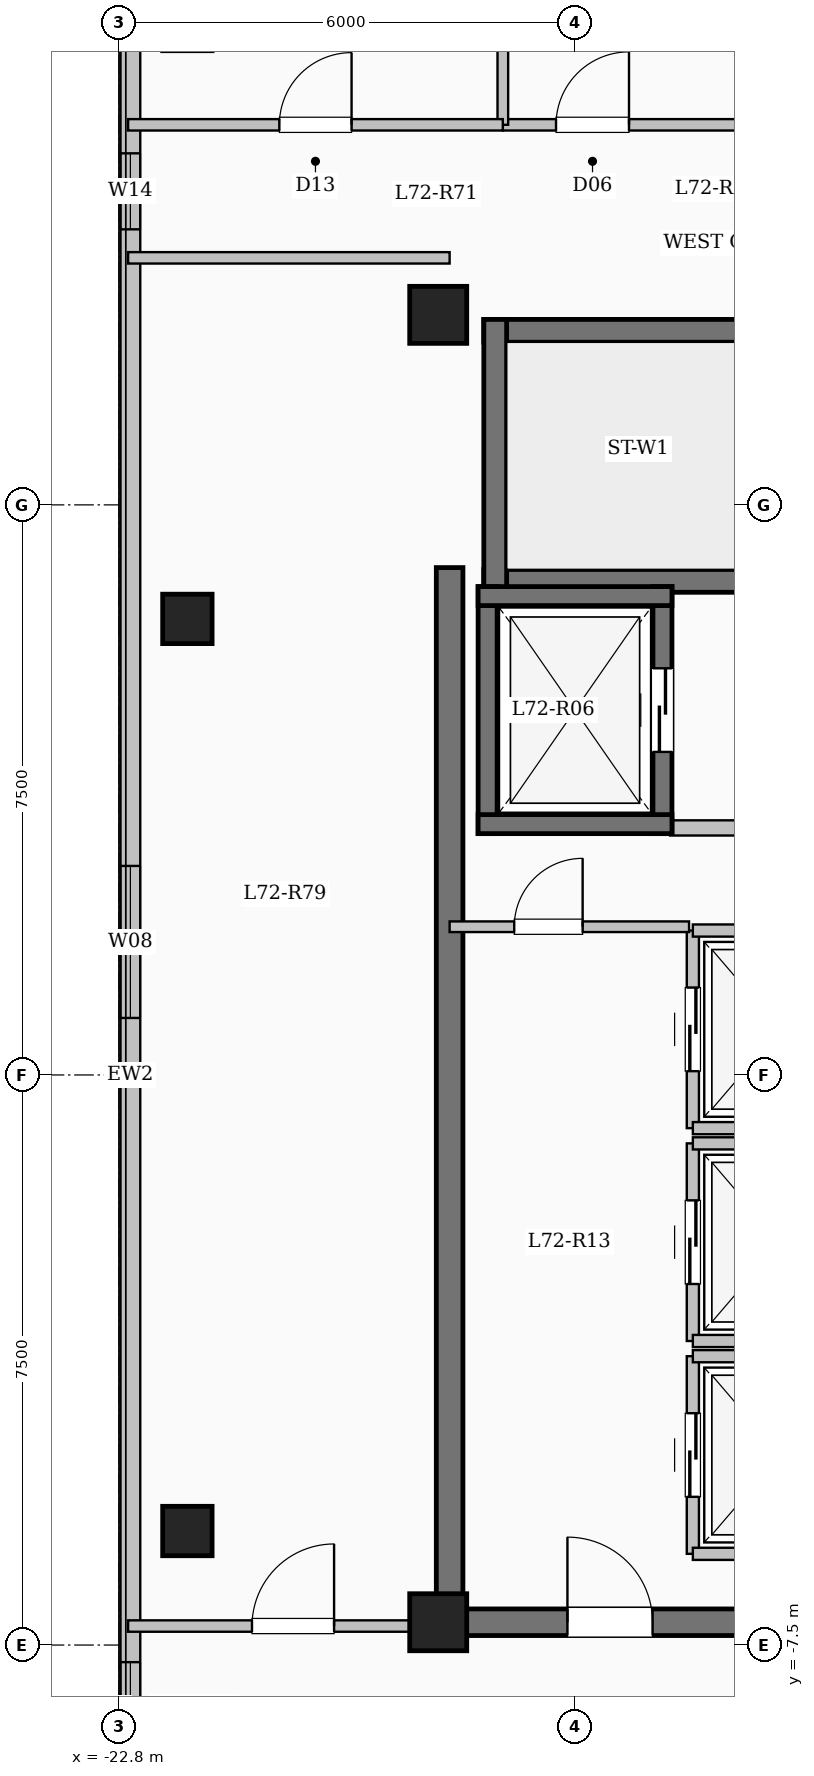
"""IFC4 building model, lengths in metres.
Left out: names, types, materials, properties, quantities, classifications, styles, units other than length and angle.
Written with IfcOpenShell. Run it as: python <this file> out.ifc"""

import sys

from ifc_helpers import new_model, si_unit, direction, frame, frame_2d, origin, origin_2d, place, context, subcontext, project, spatial, rectangle, extrude, element, fill, save


model = new_model("IFC4")
c1 = context("Model", 3, precision=1e-05, world=origin(), true_north=direction((0.0, 1.0)))
c2 = subcontext(c1, "Body", "Model", "MODEL_VIEW")
j1 = project(units=[si_unit("LENGTHUNIT", "METRE"), si_unit("PLANEANGLEUNIT", "RADIAN")], contexts=[c1])
p1 = place(None, origin())
s1 = spatial("IfcSite", under=j1, at=p1, CompositionType="ELEMENT")
p2 = place(p1, origin())
s2 = spatial("IfcBuilding", under=s1, at=p2, CompositionType="ELEMENT")
p3 = place(p2, frame((0.0, 0.0, 264.95)))
s3 = spatial("IfcBuildingStorey", under=s2, at=p3, CompositionType="ELEMENT", Elevation=264.95)
for number, where, z_axis, x_axis in (
    (1, (-18.6, -7.2, 0.0), (0.0, 0.0, 1.0), (1.0, 0.0, 0.0)),
    (2, (-18.6, 10.0, 0.0), (0.0, 0.0, 1.0), (1.0, 0.0, 0.0)),
):
    element("IfcColumn", number, at=place(p3, frame(where, z_axis=z_axis, x_axis=x_axis)), inside=s3, PredefinedType="COLUMN", context=c2, shape_type="SweptSolid", body=[
        extrude(rectangle(XDim=0.75, YDim=0.75, at=origin_2d()), origin(), (0.0, 0.0, 1.0), 3.35),
    ])
for number, where, z_axis, x_axis in (
    (3, (-21.9, -6.0, 0.0), (0.0, 0.0, 1.0), (1.0, 0.0, 0.0)),
    (4, (-21.9, 6.0, 0.0), (0.0, 0.0, 1.0), (1.0, 0.0, 0.0)),
):
    element("IfcColumn", number, at=place(p3, frame(where, z_axis=z_axis, x_axis=x_axis)), inside=s3, PredefinedType="COLUMN", context=c2, shape_type="SweptSolid", body=[
        extrude(rectangle(XDim=0.65, YDim=0.65, at=origin_2d()), origin(), (0.0, 0.0, 1.0), 3.35),
    ])
p4 = place(p3, frame((-22.65, -17.55, 0.0), z_axis=(0.0, 0.0, 1.0), x_axis=(0.0, 1.0, 0.0)))
e5 = element("IfcWall", 5, at=p4, inside=s3, PredefinedType="SOLIDWALL", context=c2, shape_type="SweptSolid", body=[
    extrude(rectangle(XDim=35.1, YDim=0.26, at=frame_2d((17.55, 0.0))), origin(), (0.0, 0.0, 1.0), 3.1),
])
p5 = place(p4, frame((2.975, 0.0, 0.9)))
e6 = element("IfcOpeningElement", 6, at=p5, cuts=e5, PredefinedType="OPENING", context=c2, shape_type="SweptSolid", body=[
    extrude(rectangle(XDim=2.2, YDim=1.75, at=frame_2d((1.1, 0.875))), frame((0.0, 0.14, 0.0), z_axis=(0.0, -1.0, 0.0), x_axis=(1.0, 0.0, 0.0)), (0.0, 0.0, 1.0), 0.28),
])
p6 = place(p4, frame((8.625, 0.0, 0.95)))
e7 = element("IfcOpeningElement", 7, at=p6, cuts=e5, PredefinedType="OPENING", context=c2, shape_type="SweptSolid", body=[
    extrude(rectangle(XDim=1.2, YDim=1.5, at=frame_2d((0.6, 0.75))), frame((0.0, 0.14, 0.0), z_axis=(0.0, -1.0, 0.0), x_axis=(1.0, 0.0, 0.0)), (0.0, 0.0, 1.0), 0.28),
])
p7 = place(p4, frame((18.3, 0.0, 0.9)))
e8 = element("IfcOpeningElement", 8, at=p7, cuts=e5, PredefinedType="OPENING", context=c2, shape_type="SweptSolid", body=[
    extrude(rectangle(XDim=2.0, YDim=1.7, at=frame_2d((1.0, 0.85))), frame((0.0, 0.14, 0.0), z_axis=(0.0, -1.0, 0.0), x_axis=(1.0, 0.0, 0.0)), (0.0, 0.0, 1.0), 0.28),
])
p8 = place(p4, frame((28.675, 0.0, 0.95)))
e9 = element("IfcOpeningElement", 9, at=p8, cuts=e5, PredefinedType="OPENING", context=c2, shape_type="SweptSolid", body=[
    extrude(rectangle(XDim=1.0, YDim=1.5, at=frame_2d((0.5, 0.75))), frame((0.0, 0.14, 0.0), z_axis=(0.0, -1.0, 0.0), x_axis=(1.0, 0.0, 0.0)), (0.0, 0.0, 1.0), 0.28),
])
p9 = place(p4, frame((31.6, 0.0, 0.9)))
e10 = element("IfcOpeningElement", 10, at=p9, cuts=e5, PredefinedType="OPENING", context=c2, shape_type="SweptSolid", body=[
    extrude(rectangle(XDim=2.0, YDim=1.7, at=frame_2d((1.0, 0.85))), frame((0.0, 0.14, 0.0), z_axis=(0.0, -1.0, 0.0), x_axis=(1.0, 0.0, 0.0)), (0.0, 0.0, 1.0), 0.28),
])
p10 = place(p3, frame((-18.0, 9.79, 0.0), z_axis=(0.0, 0.0, 1.0), x_axis=(1.0, 0.0, 0.0)))
e11 = element("IfcWall", 11, at=p10, inside=s3, PredefinedType="SHEAR", context=c2, shape_type="SweptSolid", body=[
    extrude(rectangle(XDim=8.0, YDim=0.3, at=frame_2d((4.0, 0.0))), origin(), (0.0, 0.0, 1.0), 3.35),
])
p11 = place(p3, frame((-18.0, 6.5, 0.0), z_axis=(0.0, 0.0, 1.0), x_axis=(1.0, 0.0, 0.0)))
e12 = element("IfcWall", 12, at=p11, inside=s3, PredefinedType="SHEAR", context=c2, shape_type="SweptSolid", body=[
    extrude(rectangle(XDim=8.0, YDim=0.3, at=frame_2d((4.0, 0.0))), origin(), (0.0, 0.0, 1.0), 3.35),
])
p12 = place(p11, frame((6.45, 0.0, 0.0)))
e13 = element("IfcOpeningElement", 13, at=p12, cuts=e12, PredefinedType="OPENING", context=c2, shape_type="SweptSolid", body=[
    extrude(rectangle(XDim=1.0, YDim=2.15, at=frame_2d((0.5, 1.075))), frame((0.0, 0.16, 0.0), z_axis=(0.0, -1.0, 0.0), x_axis=(1.0, 0.0, 0.0)), (0.0, 0.0, 1.0), 0.32),
])
p13 = place(p3, frame((-17.85, 6.35, 0.0), z_axis=(0.0, 0.0, 1.0), x_axis=(0.0, 1.0, 0.0)))
e14 = element("IfcWall", 14, at=p13, inside=s3, PredefinedType="SHEAR", context=c2, shape_type="SweptSolid", body=[
    extrude(rectangle(XDim=3.59, YDim=0.3, at=frame_2d((1.795, 0.0))), origin(), (0.0, 0.0, 1.0), 3.35),
])
p14 = place(p3, frame((-15.55, 3.25, 0.0), z_axis=(0.0, 0.0, 1.0), x_axis=(1.0, 0.0, 0.0)))
e15 = element("IfcWall", 15, at=p14, inside=s3, PredefinedType="SOLIDWALL", context=c2, shape_type="SweptSolid", body=[
    extrude(rectangle(XDim=5.4, YDim=0.2, at=frame_2d((2.7, 0.0))), origin(), (0.0, 0.0, 1.0), 3.1),
])
p15 = place(p3, frame((-17.95, 3.175, 0.0), z_axis=(0.0, 0.0, 1.0), x_axis=(0.0, 1.0, 0.0)))
e16 = element("IfcWall", 16, at=p15, inside=s3, PredefinedType="SHEAR", context=c2, shape_type="SweptSolid", body=[
    extrude(rectangle(XDim=3.25, YDim=0.25, at=frame_2d((1.625, 0.0))), origin(), (0.0, 0.0, 1.0), 3.35),
])
p16 = place(p3, frame((-15.65, 3.175, 0.0), z_axis=(0.0, 0.0, 1.0), x_axis=(0.0, 1.0, 0.0)))
e17 = element("IfcWall", 17, at=p16, inside=s3, PredefinedType="SHEAR", context=c2, shape_type="SweptSolid", body=[
    extrude(rectangle(XDim=3.25, YDim=0.25, at=frame_2d((1.625, 0.0))), origin(), (0.0, 0.0, 1.0), 3.35),
])
p17 = place(p16, frame((1.075, 0.0, 0.0)))
e18 = element("IfcOpeningElement", 18, at=p17, cuts=e17, PredefinedType="OPENING", context=c2, shape_type="SweptSolid", body=[
    extrude(rectangle(XDim=1.1, YDim=2.15, at=frame_2d((0.55, 1.075))), frame((0.0, 0.135, 0.0), z_axis=(0.0, -1.0, 0.0), x_axis=(1.0, 0.0, 0.0)), (0.0, 0.0, 1.0), 0.27),
])
for number, where, z_axis, x_axis in (
    (19, (-18.075, 3.3, 0.0), (0.0, 0.0, 1.0), (1.0, 0.0, 0.0)),
    (20, (-18.075, 6.3, 0.0), (0.0, 0.0, 1.0), (1.0, 0.0, 0.0)),
):
    element("IfcWall", number, at=place(p3, frame(where, z_axis=z_axis, x_axis=x_axis)), inside=s3, PredefinedType="SHEAR", context=c2, shape_type="SweptSolid", body=[
        extrude(rectangle(XDim=2.55, YDim=0.25, at=frame_2d((1.275, 0.0))), origin(), (0.0, 0.0, 1.0), 3.35),
    ])
p18 = place(p3, frame((-15.25, -6.3, 0.0), z_axis=(0.0, 0.0, 1.0), x_axis=(0.0, 1.0, 0.0)))
e21 = element("IfcWall", 21, at=p18, inside=s3, PredefinedType="SOLIDWALL", context=c2, shape_type="SweptSolid", body=[
    extrude(rectangle(XDim=2.6, YDim=0.16, at=frame_2d((1.3, 0.0))), origin(), (0.0, 0.0, 1.0), 3.1),
])
p19 = place(p18, frame((0.75, 0.0, 0.0)))
e22 = element("IfcOpeningElement", 22, at=p19, cuts=e21, PredefinedType="OPENING", context=c2, shape_type="SweptSolid", body=[
    extrude(rectangle(XDim=1.1, YDim=2.15, at=frame_2d((0.55, 1.075))), frame((0.0, 0.09, 0.0), z_axis=(0.0, -1.0, 0.0), x_axis=(1.0, 0.0, 0.0)), (0.0, 0.0, 1.0), 0.18),
])
for number, where, z_axis, x_axis in (
    (23, (-15.25, -6.3, 0.0), (0.0, 0.0, 1.0), (1.0, 0.0, 0.0)),
    (24, (-15.25, -3.7, 0.0), (0.0, 0.0, 1.0), (1.0, 0.0, 0.0)),
):
    element("IfcWall", number, at=place(p3, frame(where, z_axis=z_axis, x_axis=x_axis)), inside=s3, PredefinedType="SOLIDWALL", context=c2, shape_type="SweptSolid", body=[
        extrude(rectangle(XDim=2.3, YDim=0.16, at=frame_2d((1.15, 0.0))), origin(), (0.0, 0.0, 1.0), 3.1),
    ])
p20 = place(p3, frame((-15.25, -3.5, 0.0), z_axis=(0.0, 0.0, 1.0), x_axis=(0.0, 1.0, 0.0)))
e25 = element("IfcWall", 25, at=p20, inside=s3, PredefinedType="SOLIDWALL", context=c2, shape_type="SweptSolid", body=[
    extrude(rectangle(XDim=2.6, YDim=0.16, at=frame_2d((1.3, 0.0))), origin(), (0.0, 0.0, 1.0), 3.1),
])
p21 = place(p20, frame((0.75, 0.0, 0.0)))
e26 = element("IfcOpeningElement", 26, at=p21, cuts=e25, PredefinedType="OPENING", context=c2, shape_type="SweptSolid", body=[
    extrude(rectangle(XDim=1.1, YDim=2.15, at=frame_2d((0.55, 1.075))), frame((0.0, 0.09, 0.0), z_axis=(0.0, -1.0, 0.0), x_axis=(1.0, 0.0, 0.0)), (0.0, 0.0, 1.0), 0.18),
])
for number, where, z_axis, x_axis in (
    (27, (-15.25, -3.5, 0.0), (0.0, 0.0, 1.0), (1.0, 0.0, 0.0)),
    (28, (-15.25, -0.9, 0.0), (0.0, 0.0, 1.0), (1.0, 0.0, 0.0)),
):
    element("IfcWall", number, at=place(p3, frame(where, z_axis=z_axis, x_axis=x_axis)), inside=s3, PredefinedType="SOLIDWALL", context=c2, shape_type="SweptSolid", body=[
        extrude(rectangle(XDim=2.3, YDim=0.16, at=frame_2d((1.15, 0.0))), origin(), (0.0, 0.0, 1.0), 3.1),
    ])
p22 = place(p3, frame((-15.25, -0.7, 0.0), z_axis=(0.0, 0.0, 1.0), x_axis=(0.0, 1.0, 0.0)))
e29 = element("IfcWall", 29, at=p22, inside=s3, PredefinedType="SOLIDWALL", context=c2, shape_type="SweptSolid", body=[
    extrude(rectangle(XDim=2.6, YDim=0.16, at=frame_2d((1.3, 0.0))), origin(), (0.0, 0.0, 1.0), 3.1),
])
p23 = place(p22, frame((0.75, 0.0, 0.0)))
e30 = element("IfcOpeningElement", 30, at=p23, cuts=e29, PredefinedType="OPENING", context=c2, shape_type="SweptSolid", body=[
    extrude(rectangle(XDim=1.1, YDim=2.15, at=frame_2d((0.55, 1.075))), frame((0.0, 0.09, 0.0), z_axis=(0.0, -1.0, 0.0), x_axis=(1.0, 0.0, 0.0)), (0.0, 0.0, 1.0), 0.18),
])
for number, where, z_axis, x_axis in (
    (31, (-15.25, -0.7, 0.0), (0.0, 0.0, 1.0), (1.0, 0.0, 0.0)),
    (32, (-15.25, 1.9, 0.0), (0.0, 0.0, 1.0), (1.0, 0.0, 0.0)),
):
    element("IfcWall", number, at=place(p3, frame(where, z_axis=z_axis, x_axis=x_axis)), inside=s3, PredefinedType="SOLIDWALL", context=c2, shape_type="SweptSolid", body=[
        extrude(rectangle(XDim=2.3, YDim=0.16, at=frame_2d((1.15, 0.0))), origin(), (0.0, 0.0, 1.0), 3.1),
    ])
p24 = place(p3, frame((-18.45, -7.375, 0.0), z_axis=(0.0, 0.0, 1.0), x_axis=(0.0, 1.0, 0.0)))
e33 = element("IfcWall", 33, at=p24, inside=s3, PredefinedType="SHEAR", context=c2, shape_type="SweptSolid", body=[
    extrude(rectangle(XDim=14.05, YDim=0.35, at=frame_2d((7.025, 0.0))), origin(), (0.0, 0.0, 1.0), 3.35),
])
p25 = place(p3, frame((-18.625, -7.2, 0.0), z_axis=(0.0, 0.0, 1.0), x_axis=(1.0, 0.0, 0.0)))
e34 = element("IfcWall", 34, at=p25, inside=s3, PredefinedType="SHEAR", context=c2, shape_type="SweptSolid", body=[
    extrude(rectangle(XDim=8.55, YDim=0.35, at=frame_2d((4.275, 0.0))), origin(), (0.0, 0.0, 1.0), 3.35),
])
p26 = place(p25, frame((1.725, 0.0, 0.0)))
e35 = element("IfcOpeningElement", 35, at=p26, cuts=e34, PredefinedType="OPENING", context=c2, shape_type="SweptSolid", body=[
    extrude(rectangle(XDim=1.12, YDim=2.15, at=frame_2d((0.56, 1.075))), frame((0.0, 0.185, 0.0), z_axis=(0.0, -1.0, 0.0), x_axis=(1.0, 0.0, 0.0)), (0.0, 0.0, 1.0), 0.37),
])
p27 = place(p3, frame((-18.45, 1.95, 0.0), z_axis=(0.0, 0.0, 1.0), x_axis=(1.0, 0.0, 0.0)))
e36 = element("IfcWall", 36, at=p27, inside=s3, PredefinedType="PARTITIONING", context=c2, shape_type="SweptSolid", body=[
    extrude(rectangle(XDim=3.15, YDim=0.14, at=frame_2d((1.575, 0.0))), origin(), (0.0, 0.0, 1.0), 3.1),
])
p28 = place(p27, frame((0.85, 0.0, 0.0)))
e37 = element("IfcOpeningElement", 37, at=p28, cuts=e36, PredefinedType="OPENING", context=c2, shape_type="SweptSolid", body=[
    extrude(rectangle(XDim=0.9, YDim=2.08, at=frame_2d((0.45, 1.04))), frame((0.0, 0.08, 0.0), z_axis=(0.0, -1.0, 0.0), x_axis=(1.0, 0.0, 0.0)), (0.0, 0.0, 1.0), 0.16),
])
p29 = place(p3, frame((-17.75, 12.5, 0.0), z_axis=(0.0, 0.0, 1.0), x_axis=(1.0, 0.0, 0.0)))
e38 = element("IfcWall", 38, at=p29, inside=s3, PredefinedType="PARTITIONING", context=c2, shape_type="SweptSolid", body=[
    extrude(rectangle(XDim=13.9, YDim=0.15, at=frame_2d((6.95, 0.0))), origin(), (0.0, 0.0, 1.0), 3.1),
])
p30 = place(p29, frame((0.7, 0.0, 0.0)))
e39 = element("IfcOpeningElement", 39, at=p30, cuts=e38, PredefinedType="OPENING", context=c2, shape_type="SweptSolid", body=[
    extrude(rectangle(XDim=0.96, YDim=2.15, at=frame_2d((0.48, 1.075))), frame((0.0, 0.085, 0.0), z_axis=(0.0, -1.0, 0.0), x_axis=(1.0, 0.0, 0.0)), (0.0, 0.0, 1.0), 0.17),
])
p31 = place(p29, frame((7.105, 0.0, 0.0)))
e40 = element("IfcOpeningElement", 40, at=p31, cuts=e38, PredefinedType="OPENING", context=c2, shape_type="SweptSolid", body=[
    extrude(rectangle(XDim=0.96, YDim=2.15, at=frame_2d((0.48, 1.075))), frame((0.0, 0.085, 0.0), z_axis=(0.0, -1.0, 0.0), x_axis=(1.0, 0.0, 0.0)), (0.0, 0.0, 1.0), 0.17),
])
p32 = place(p29, frame((12.57, 0.0, 0.0)))
e41 = element("IfcOpeningElement", 41, at=p32, cuts=e38, PredefinedType="OPENING", context=c2, shape_type="SweptSolid", body=[
    extrude(rectangle(XDim=0.96, YDim=2.15, at=frame_2d((0.48, 1.075))), frame((0.0, 0.085, 0.0), z_axis=(0.0, -1.0, 0.0), x_axis=(1.0, 0.0, 0.0)), (0.0, 0.0, 1.0), 0.17),
])
p33 = place(p3, frame((-22.68, -7.25, 0.0), z_axis=(0.0, 0.0, 1.0), x_axis=(1.0, 0.0, 0.0)))
e42 = element("IfcWall", 42, at=p33, inside=s3, PredefinedType="PARTITIONING", context=c2, shape_type="SweptSolid", body=[
    extrude(rectangle(XDim=4.23, YDim=0.15, at=frame_2d((2.115, 0.0))), origin(), (0.0, 0.0, 1.0), 3.1),
])
p34 = place(p33, frame((1.63, 0.0, 0.0)))
e43 = element("IfcOpeningElement", 43, at=p34, cuts=e42, PredefinedType="OPENING", context=c2, shape_type="SweptSolid", body=[
    extrude(rectangle(XDim=1.08, YDim=2.15, at=frame_2d((0.54, 1.075))), frame((0.0, 0.085, 0.0), z_axis=(0.0, -1.0, 0.0), x_axis=(1.0, 0.0, 0.0)), (0.0, 0.0, 1.0), 0.17),
])
p35 = place(p3, frame((-22.68, 10.75, 0.0), z_axis=(0.0, 0.0, 1.0), x_axis=(1.0, 0.0, 0.0)))
e44 = element("IfcWall", 44, at=p35, inside=s3, PredefinedType="PARTITIONING", context=c2, shape_type="SweptSolid", body=[
    extrude(rectangle(XDim=4.23, YDim=0.15, at=frame_2d((2.115, 0.0))), origin(), (0.0, 0.0, 1.0), 3.1),
])
p36 = place(p3, frame((-17.75, 12.5, 0.0), z_axis=(0.0, 0.0, 1.0), x_axis=(0.0, 1.0, 0.0)))
e45 = element("IfcWall", 45, at=p36, inside=s3, PredefinedType="PARTITIONING", context=c2, shape_type="SweptSolid", body=[
    extrude(rectangle(XDim=5.05, YDim=0.14, at=frame_2d((2.525, 0.0))), origin(), (0.0, 0.0, 1.0), 3.1),
])
p37 = place(p3, frame((-22.68, 12.5, 0.0), z_axis=(0.0, 0.0, 1.0), x_axis=(1.0, 0.0, 0.0)))
e46 = element("IfcWall", 46, at=p37, inside=s3, PredefinedType="PARTITIONING", context=c2, shape_type="SweptSolid", body=[
    extrude(rectangle(XDim=4.93, YDim=0.15, at=frame_2d((2.465, 0.0))), origin(), (0.0, 0.0, 1.0), 3.1),
])
p38 = place(p37, frame((1.99, 0.0, 0.0)))
e47 = element("IfcOpeningElement", 47, at=p38, cuts=e46, PredefinedType="OPENING", context=c2, shape_type="SweptSolid", body=[
    extrude(rectangle(XDim=0.95, YDim=2.15, at=frame_2d((0.475, 1.075))), frame((0.0, 0.085, 0.0), z_axis=(0.0, -1.0, 0.0), x_axis=(1.0, 0.0, 0.0)), (0.0, 0.0, 1.0), 0.17),
])
p39 = place(p6, origin())
e48 = element("IfcWindow", 48, at=p39, inside=s3, PartitioningType="SINGLE_PANEL", PredefinedType="WINDOW", context=c2, shape_type="SweptSolid", body=[
    extrude(rectangle(XDim=1.2, YDim=1.5, at=frame_2d((0.6, 0.75))), frame((0.0, 0.03, 0.0), z_axis=(0.0, -1.0, 0.0), x_axis=(1.0, 0.0, 0.0)), (0.0, 0.0, 1.0), 0.06),
])
fill(e7, e48)
p40 = place(p7, origin())
e49 = element("IfcWindow", 49, at=p40, inside=s3, PartitioningType="SINGLE_PANEL", PredefinedType="WINDOW", context=c2, shape_type="SweptSolid", body=[
    extrude(rectangle(XDim=2.0, YDim=1.7, at=frame_2d((1.0, 0.85))), frame((0.0, 0.03, 0.0), z_axis=(0.0, -1.0, 0.0), x_axis=(1.0, 0.0, 0.0)), (0.0, 0.0, 1.0), 0.06),
])
fill(e8, e49)
p41 = place(p8, origin())
e50 = element("IfcWindow", 50, at=p41, inside=s3, PartitioningType="SINGLE_PANEL", PredefinedType="WINDOW", context=c2, shape_type="SweptSolid", body=[
    extrude(rectangle(XDim=1.0, YDim=1.5, at=frame_2d((0.5, 0.75))), frame((0.0, 0.03, 0.0), z_axis=(0.0, -1.0, 0.0), x_axis=(1.0, 0.0, 0.0)), (0.0, 0.0, 1.0), 0.06),
])
fill(e9, e50)
p42 = place(p17, origin())
e51 = element("IfcDoor", 51, at=p42, inside=s3, OperationType="SLIDING_TO_LEFT", PredefinedType="DOOR", context=c2, shape_type="SweptSolid", body=[
    extrude(rectangle(XDim=1.1, YDim=2.15, at=frame_2d((0.55, 1.075))), frame((0.0, 0.025, 0.0), z_axis=(0.0, -1.0, 0.0), x_axis=(1.0, 0.0, 0.0)), (0.0, 0.0, 1.0), 0.05),
])
fill(e18, e51)
p43 = place(p19, origin())
e52 = element("IfcDoor", 52, at=p43, inside=s3, OperationType="SLIDING_TO_LEFT", PredefinedType="DOOR", context=c2, shape_type="SweptSolid", body=[
    extrude(rectangle(XDim=1.1, YDim=2.15, at=frame_2d((0.55, 1.075))), frame((0.0, 0.025, 0.0), z_axis=(0.0, -1.0, 0.0), x_axis=(1.0, 0.0, 0.0)), (0.0, 0.0, 1.0), 0.05),
])
fill(e22, e52)
p44 = place(p21, origin())
e53 = element("IfcDoor", 53, at=p44, inside=s3, OperationType="SLIDING_TO_LEFT", PredefinedType="DOOR", context=c2, shape_type="SweptSolid", body=[
    extrude(rectangle(XDim=1.1, YDim=2.15, at=frame_2d((0.55, 1.075))), frame((0.0, 0.025, 0.0), z_axis=(0.0, -1.0, 0.0), x_axis=(1.0, 0.0, 0.0)), (0.0, 0.0, 1.0), 0.05),
])
fill(e26, e53)
p45 = place(p23, origin())
e54 = element("IfcDoor", 54, at=p45, inside=s3, OperationType="SLIDING_TO_LEFT", PredefinedType="DOOR", context=c2, shape_type="SweptSolid", body=[
    extrude(rectangle(XDim=1.1, YDim=2.15, at=frame_2d((0.55, 1.075))), frame((0.0, 0.025, 0.0), z_axis=(0.0, -1.0, 0.0), x_axis=(1.0, 0.0, 0.0)), (0.0, 0.0, 1.0), 0.05),
])
fill(e30, e54)
p46 = place(p26, origin())
e55 = element("IfcDoor", 55, at=p46, inside=s3, OperationType="SINGLE_SWING_LEFT", PredefinedType="DOOR", context=c2, shape_type="SweptSolid", body=[
    extrude(rectangle(XDim=1.12, YDim=2.15, at=frame_2d((0.56, 1.075))), frame((0.0, 0.025, 0.0), z_axis=(0.0, -1.0, 0.0), x_axis=(1.0, 0.0, 0.0)), (0.0, 0.0, 1.0), 0.05),
])
fill(e35, e55)
p47 = place(p28, origin())
e56 = element("IfcDoor", 56, at=p47, inside=s3, OperationType="SINGLE_SWING_RIGHT", PredefinedType="DOOR", context=c2, shape_type="SweptSolid", body=[
    extrude(rectangle(XDim=0.9, YDim=2.08, at=frame_2d((0.45, 1.04))), frame((0.0, 0.025, 0.0), z_axis=(0.0, -1.0, 0.0), x_axis=(1.0, 0.0, 0.0)), (0.0, 0.0, 1.0), 0.05),
])
fill(e37, e56)
p48 = place(p30, origin())
e57 = element("IfcDoor", 57, at=p48, inside=s3, OperationType="SINGLE_SWING_RIGHT", PredefinedType="DOOR", context=c2, shape_type="SweptSolid", body=[
    extrude(rectangle(XDim=0.96, YDim=2.15, at=frame_2d((0.48, 1.075))), frame((0.0, 0.025, 0.0), z_axis=(0.0, -1.0, 0.0), x_axis=(1.0, 0.0, 0.0)), (0.0, 0.0, 1.0), 0.05),
])
fill(e39, e57)
p49 = place(p38, origin())
e58 = element("IfcDoor", 58, at=p49, inside=s3, OperationType="SINGLE_SWING_RIGHT", PredefinedType="DOOR", context=c2, shape_type="SweptSolid", body=[
    extrude(rectangle(XDim=0.95, YDim=2.15, at=frame_2d((0.475, 1.075))), frame((0.0, 0.025, 0.0), z_axis=(0.0, -1.0, 0.0), x_axis=(1.0, 0.0, 0.0)), (0.0, 0.0, 1.0), 0.05),
])
fill(e47, e58)
p50 = place(p34, origin())
e59 = element("IfcDoor", 59, at=p50, inside=s3, OperationType="SINGLE_SWING_RIGHT", PredefinedType="DOOR", context=c2, shape_type="SweptSolid", body=[
    extrude(rectangle(XDim=1.08, YDim=2.15, at=frame_2d((0.54, 1.075))), frame((0.0, 0.025, 0.0), z_axis=(0.0, -1.0, 0.0), x_axis=(1.0, 0.0, 0.0)), (0.0, 0.0, 1.0), 0.05),
])
fill(e43, e59)
save(model, sys.argv[1])
